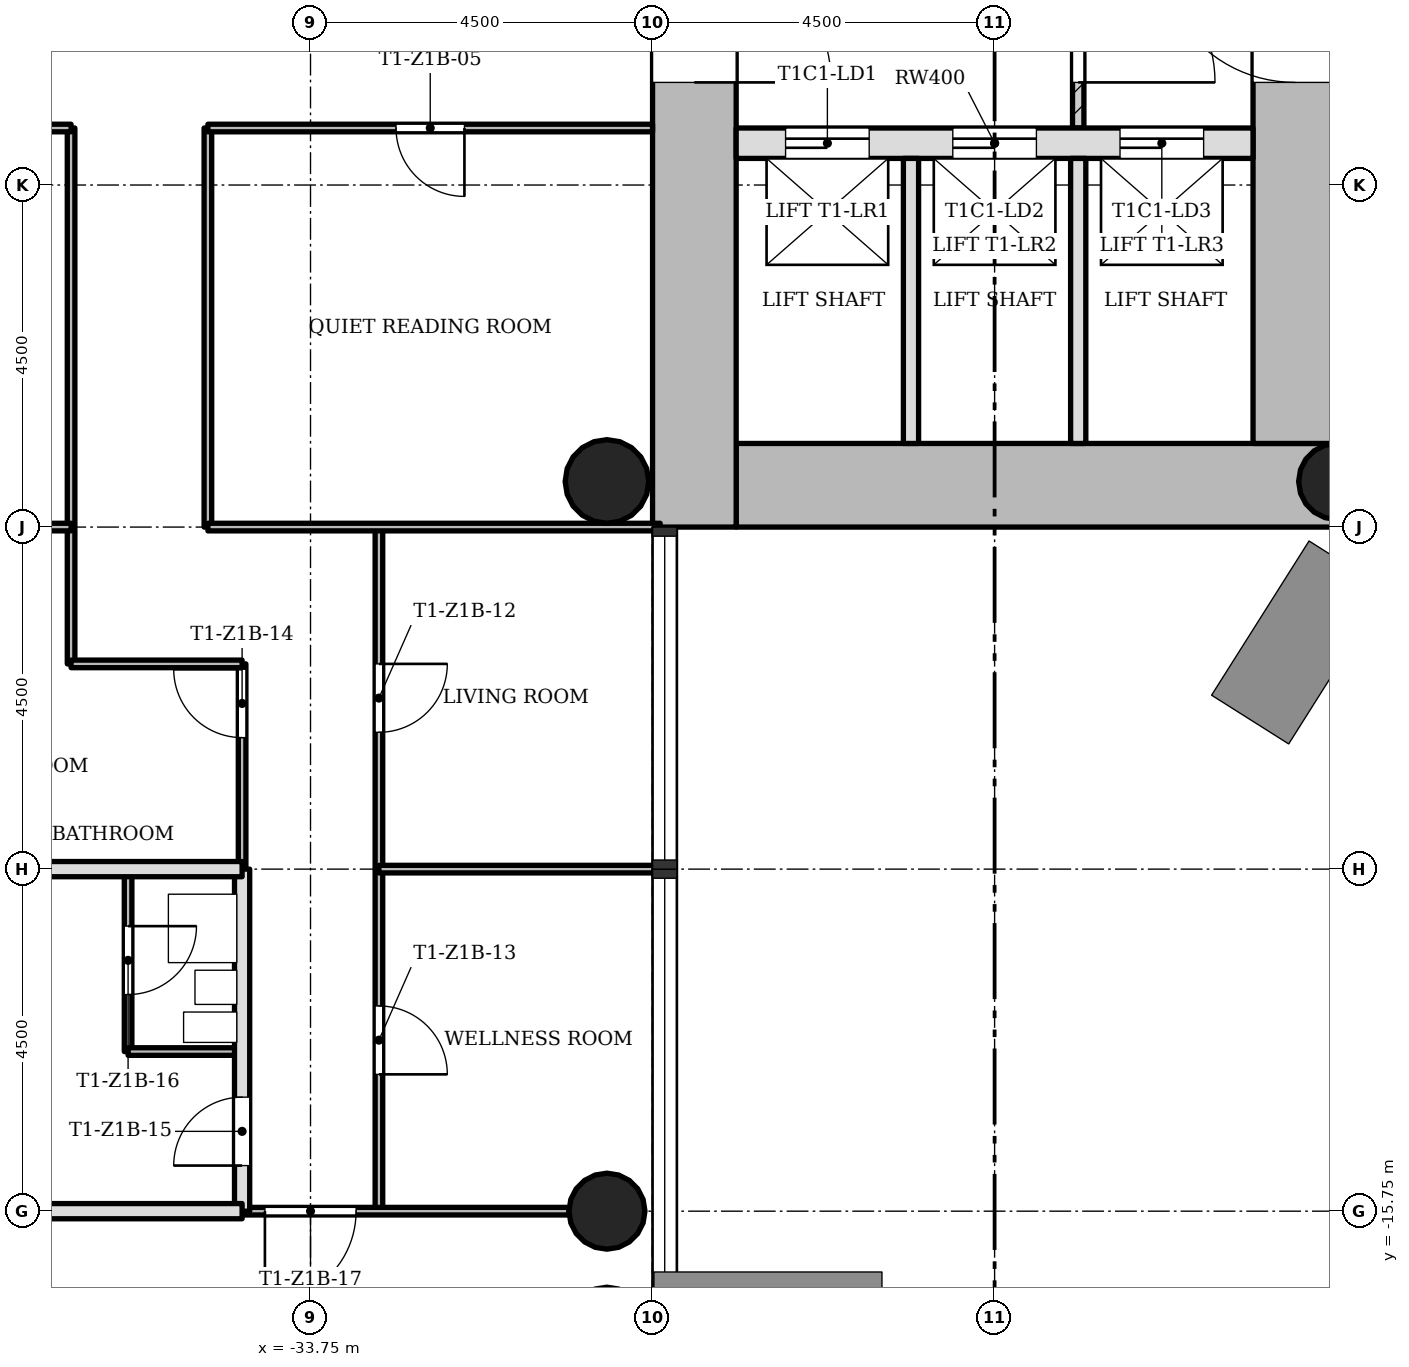
"""IFC4 building model, lengths in metres.
Left out: names, types, materials, properties, quantities, classifications, styles, units other than length and angle.
Written with IfcOpenShell. Run it as: python <this file> out.ifc"""

import sys

from ifc_helpers import new_model, si_unit, direction, frame, frame_2d, origin, origin_2d, place, context, subcontext, project, spatial, rectangle, hollow_circle, extrude, element, fill, save


model = new_model("IFC4")
c1 = context("Model", 3, precision=1e-05, world=origin(), true_north=direction((0.0, 1.0)))
c2 = subcontext(c1, "Body", "Model", "MODEL_VIEW")
j1 = project(units=[si_unit("LENGTHUNIT", "METRE"), si_unit("PLANEANGLEUNIT", "RADIAN")], contexts=[c1])
p1 = place(None, origin())
s1 = spatial("IfcSite", under=j1, at=p1, CompositionType="ELEMENT")
p2 = place(p1, origin())
s2 = spatial("IfcBuilding", under=s1, at=p2, CompositionType="ELEMENT")
p3 = place(p2, frame((0.0, 0.0, 38.1)))
s3 = spatial("IfcBuildingStorey", under=s2, at=p3, CompositionType="ELEMENT", Elevation=38.1)
p4 = place(p3, frame((-28.15, -6.2, 0.0), z_axis=(0.0, 0.0, 1.0), x_axis=(1.0, 0.0, 0.0)))
e1 = element("IfcWall", 1, at=p4, inside=s3, PredefinedType="SHEAR", context=c2, shape_type="SweptSolid", body=[
    extrude(rectangle(XDim=7.9, YDim=1.1, at=frame_2d((3.95, 0.0))), origin(), (0.0, 0.0, 1.0), 3.4),
])
p5 = place(p3, frame((-20.8, -5.65, 0.0), z_axis=(0.0, 0.0, 1.0), x_axis=(0.0, 1.0, 0.0)))
e2 = element("IfcWall", 2, at=p5, inside=s3, PredefinedType="SHEAR", context=c2, shape_type="SweptSolid", body=[
    extrude(rectangle(XDim=12.4, YDim=1.1, at=frame_2d((6.2, 0.0))), origin(), (0.0, 0.0, 1.0), 3.4),
])
p6 = place(p5, frame((4.75, 0.0, 0.0)))
e3 = element("IfcOpeningElement", 3, at=p6, cuts=e2, PredefinedType="OPENING", context=c2, shape_type="SweptSolid", body=[
    extrude(rectangle(XDim=1.8, YDim=2.1, at=frame_2d((0.9, 1.05))), frame((0.0, 0.56, 0.0), z_axis=(0.0, -1.0, 0.0), x_axis=(1.0, 0.0, 0.0)), (0.0, 0.0, 1.0), 1.12),
])
p7 = place(p3, frame((-28.7, 5.65, 0.0), z_axis=(0.0, 0.0, 1.0), x_axis=(0.0, -1.0, 0.0)))
e4 = element("IfcWall", 4, at=p7, inside=s3, PredefinedType="SHEAR", context=c2, shape_type="SweptSolid", body=[
    extrude(rectangle(XDim=12.4, YDim=1.1, at=frame_2d((6.2, 0.0))), origin(), (0.0, 0.0, 1.0), 3.4),
])
p8 = place(p7, frame((4.75, 0.0, 0.0)))
e5 = element("IfcOpeningElement", 5, at=p8, cuts=e4, PredefinedType="OPENING", context=c2, shape_type="SweptSolid", body=[
    extrude(rectangle(XDim=1.8, YDim=2.1, at=frame_2d((0.9, 1.05))), frame((0.0, 0.56, 0.0), z_axis=(0.0, -1.0, 0.0), x_axis=(1.0, 0.0, 0.0)), (0.0, 0.0, 1.0), 1.12),
])
p9 = place(p3, frame((-28.15, -1.7, 0.0), z_axis=(0.0, 0.0, 1.0), x_axis=(1.0, 0.0, 0.0)))
e6 = element("IfcWall", 6, at=p9, inside=s3, PredefinedType="SHEAR", context=c2, shape_type="SweptSolid", body=[
    extrude(rectangle(XDim=6.8, YDim=0.4, at=frame_2d((3.4, 0.0))), origin(), (0.0, 0.0, 1.0), 3.4),
])
p10 = place(p9, frame((0.65, 0.0, 0.0)))
e7 = element("IfcOpeningElement", 7, at=p10, cuts=e6, PredefinedType="OPENING", context=c2, shape_type="SweptSolid", body=[
    extrude(rectangle(XDim=1.1, YDim=2.1, at=frame_2d((0.55, 1.05))), frame((0.0, 0.21, 0.0), z_axis=(0.0, -1.0, 0.0), x_axis=(1.0, 0.0, 0.0)), (0.0, 0.0, 1.0), 0.42),
])
p11 = place(p9, frame((2.85, 0.0, 0.0)))
e8 = element("IfcOpeningElement", 8, at=p11, cuts=e6, PredefinedType="OPENING", context=c2, shape_type="SweptSolid", body=[
    extrude(rectangle(XDim=1.1, YDim=2.1, at=frame_2d((0.55, 1.05))), frame((0.0, 0.21, 0.0), z_axis=(0.0, -1.0, 0.0), x_axis=(1.0, 0.0, 0.0)), (0.0, 0.0, 1.0), 0.42),
])
p12 = place(p9, frame((5.05, 0.0, 0.0)))
e9 = element("IfcOpeningElement", 9, at=p12, cuts=e6, PredefinedType="OPENING", context=c2, shape_type="SweptSolid", body=[
    extrude(rectangle(XDim=1.1, YDim=2.1, at=frame_2d((0.55, 1.05))), frame((0.0, 0.21, 0.0), z_axis=(0.0, -1.0, 0.0), x_axis=(1.0, 0.0, 0.0)), (0.0, 0.0, 1.0), 0.42),
])
for number, where, z_axis, x_axis in (
    (10, (-20.25, -6.15, 0.0), (0.0, 0.0, 1.0), (1.0, 0.0, 0.0)),
    (11, (-29.85, -15.75, 0.0), (0.0, 0.0, 1.0), (1.0, 0.0, 0.0)),
):
    element("IfcColumn", number, at=place(p3, frame(where, z_axis=z_axis, x_axis=x_axis)), inside=s3, PredefinedType="COLUMN", context=c2, shape_type="SweptSolid", body=[
        extrude(hollow_circle(Radius=0.5, WallThickness=0.036, at=origin_2d()), origin(), (0.0, 0.0, 1.0), 3.4),
    ])
p13 = place(p3, frame((-29.85, -6.15, 0.0), z_axis=(0.0, 0.0, 1.0), x_axis=(1.0, 0.0, 0.0)))
e12 = element("IfcColumn", 12, at=p13, inside=s3, PredefinedType="COLUMN", context=c2, shape_type="SweptSolid", body=[
    extrude(hollow_circle(Radius=0.55, WallThickness=0.04, at=origin_2d()), origin(), (0.0, 0.0, 1.0), 3.4),
])
p14 = place(p3, frame((-23.65, -1.5, 0.0), z_axis=(0.0, 0.0, 1.0), x_axis=(0.0, 1.0, 0.0)))
e13 = element("IfcWall", 13, at=p14, inside=s3, PredefinedType="PARTITIONING", context=c2, shape_type="SweptSolid", body=[
    extrude(rectangle(XDim=3.0, YDim=0.15, at=frame_2d((1.5, 0.0))), origin(), (0.0, 0.0, 1.0), 3.0),
])
p15 = place(p14, frame((0.6, 0.0, 0.0)))
e14 = element("IfcOpeningElement", 14, at=p15, cuts=e13, PredefinedType="OPENING", context=c2, shape_type="SweptSolid", body=[
    extrude(rectangle(XDim=1.8, YDim=2.1, at=frame_2d((0.9, 1.05))), frame((0.0, 0.085, 0.0), z_axis=(0.0, -1.0, 0.0), x_axis=(1.0, 0.0, 0.0)), (0.0, 0.0, 1.0), 0.17),
])
for number, where, z_axis, x_axis in (
    (15, (-25.85, -5.65, 0.0), (0.0, 0.0, 1.0), (0.0, 1.0, 0.0)),
    (16, (-23.65, -5.65, 0.0), (0.0, 0.0, 1.0), (0.0, 1.0, 0.0)),
):
    element("IfcWall", number, at=place(p3, frame(where, z_axis=z_axis, x_axis=x_axis)), inside=s3, PredefinedType="SOLIDWALL", context=c2, shape_type="SweptSolid", body=[
        extrude(rectangle(XDim=3.75, YDim=0.2, at=frame_2d((1.875, 0.0))), origin(), (0.0, 0.0, 1.0), 3.0),
    ])
p16 = place(p3, frame((-36.9, -8.55, 0.0), z_axis=(0.0, 0.0, 1.0), x_axis=(0.0, 1.0, 0.0)))
e17 = element("IfcWall", 17, at=p16, inside=s3, PredefinedType="PARTITIONING", context=c2, shape_type="SweptSolid", body=[
    extrude(rectangle(XDim=7.05, YDim=0.1, at=frame_2d((3.525, 0.0))), origin(), (0.0, 0.0, 1.0), 3.0),
])
p17 = place(p3, frame((-36.15, -13.65, 0.0), z_axis=(0.0, 0.0, 1.0), x_axis=(0.0, 1.0, 0.0)))
e18 = element("IfcWall", 18, at=p17, inside=s3, PredefinedType="PARTITIONING", context=c2, shape_type="SweptSolid", body=[
    extrude(rectangle(XDim=2.4, YDim=0.1, at=frame_2d((1.2, 0.0))), origin(), (0.0, 0.0, 1.0), 3.0),
])
p18 = place(p17, frame((0.75, 0.0, 0.0)))
e19 = element("IfcOpeningElement", 19, at=p18, cuts=e18, PredefinedType="OPENING", context=c2, shape_type="SweptSolid", body=[
    extrude(rectangle(XDim=0.9, YDim=2.1, at=frame_2d((0.45, 1.05))), frame((0.0, 0.06, 0.0), z_axis=(0.0, -1.0, 0.0), x_axis=(1.0, 0.0, 0.0)), (0.0, 0.0, 1.0), 0.12),
])
p19 = place(p3, frame((-35.1, -6.75, 0.0), z_axis=(0.0, 0.0, 1.0), x_axis=(0.0, 1.0, 0.0)))
e20 = element("IfcWall", 20, at=p19, inside=s3, PredefinedType="PARTITIONING", context=c2, shape_type="SweptSolid", body=[
    extrude(rectangle(XDim=5.25, YDim=0.1, at=frame_2d((2.625, 0.0))), origin(), (0.0, 0.0, 1.0), 3.0),
])
p20 = place(p3, frame((-34.65, -11.25, 0.0), z_axis=(0.0, 0.0, 1.0), x_axis=(0.0, 1.0, 0.0)))
e21 = element("IfcWall", 21, at=p20, inside=s3, PredefinedType="PARTITIONING", context=c2, shape_type="SweptSolid", body=[
    extrude(rectangle(XDim=2.7, YDim=0.1, at=frame_2d((1.35, 0.0))), origin(), (0.0, 0.0, 1.0), 3.0),
])
p21 = place(p20, frame((1.73, 0.0, 0.0)))
e22 = element("IfcOpeningElement", 22, at=p21, cuts=e21, PredefinedType="OPENING", context=c2, shape_type="SweptSolid", body=[
    extrude(rectangle(XDim=0.9, YDim=2.1, at=frame_2d((0.45, 1.05))), frame((0.0, 0.06, 0.0), z_axis=(0.0, -1.0, 0.0), x_axis=(1.0, 0.0, 0.0)), (0.0, 0.0, 1.0), 0.12),
])
p22 = place(p3, frame((-34.65, -15.75, 0.0), z_axis=(0.0, 0.0, 1.0), x_axis=(0.0, 1.0, 0.0)))
e23 = element("IfcWall", 23, at=p22, inside=s3, PredefinedType="SOLIDWALL", context=c2, shape_type="SweptSolid", body=[
    extrude(rectangle(XDim=4.5, YDim=0.2, at=frame_2d((2.25, 0.0))), origin(), (0.0, 0.0, 1.0), 3.0),
])
p23 = place(p22, frame((0.6, 0.0, 0.0)))
e24 = element("IfcOpeningElement", 24, at=p23, cuts=e23, PredefinedType="OPENING", context=c2, shape_type="SweptSolid", body=[
    extrude(rectangle(XDim=0.9, YDim=2.1, at=frame_2d((0.45, 1.05))), frame((0.0, 0.11, 0.0), z_axis=(0.0, -1.0, 0.0), x_axis=(1.0, 0.0, 0.0)), (0.0, 0.0, 1.0), 0.22),
])
p24 = place(p3, frame((-32.85, -15.75, 0.0), z_axis=(0.0, 0.0, 1.0), x_axis=(0.0, 1.0, 0.0)))
e25 = element("IfcWall", 25, at=p24, inside=s3, PredefinedType="PARTITIONING", context=c2, shape_type="SweptSolid", body=[
    extrude(rectangle(XDim=9.0, YDim=0.1, at=frame_2d((4.5, 0.0))), origin(), (0.0, 0.0, 1.0), 3.0),
])
p25 = place(p24, frame((6.3, 0.0, 0.0)))
e26 = element("IfcOpeningElement", 26, at=p25, cuts=e25, PredefinedType="OPENING", context=c2, shape_type="SweptSolid", body=[
    extrude(rectangle(XDim=0.9, YDim=2.1, at=frame_2d((0.45, 1.05))), frame((0.0, 0.06, 0.0), z_axis=(0.0, -1.0, 0.0), x_axis=(1.0, 0.0, 0.0)), (0.0, 0.0, 1.0), 0.12),
])
p26 = place(p24, frame((1.8, 0.0, 0.0)))
e27 = element("IfcOpeningElement", 27, at=p26, cuts=e25, PredefinedType="OPENING", context=c2, shape_type="SweptSolid", body=[
    extrude(rectangle(XDim=0.9, YDim=2.1, at=frame_2d((0.45, 1.05))), frame((0.0, 0.06, 0.0), z_axis=(0.0, -1.0, 0.0), x_axis=(1.0, 0.0, 0.0)), (0.0, 0.0, 1.0), 0.12),
])
p27 = place(p3, frame((-34.65, -15.75, 0.0), z_axis=(0.0, 0.0, 1.0), x_axis=(1.0, 0.0, 0.0)))
e28 = element("IfcWall", 28, at=p27, inside=s3, PredefinedType="PARTITIONING", context=c2, shape_type="SweptSolid", body=[
    extrude(rectangle(XDim=4.3, YDim=0.1, at=frame_2d((2.15, 0.0))), origin(), (0.0, 0.0, 1.0), 3.0),
])
p28 = place(p27, frame((0.3, 0.0, 0.0)))
e29 = element("IfcOpeningElement", 29, at=p28, cuts=e28, PredefinedType="OPENING", context=c2, shape_type="SweptSolid", body=[
    extrude(rectangle(XDim=1.2, YDim=2.1, at=frame_2d((0.6, 1.05))), frame((0.0, 0.06, 0.0), z_axis=(0.0, -1.0, 0.0), x_axis=(1.0, 0.0, 0.0)), (0.0, 0.0, 1.0), 0.12),
])
p29 = place(p3, frame((-41.65, -15.75, 0.0), z_axis=(0.0, 0.0, 1.0), x_axis=(1.0, 0.0, 0.0)))
e30 = element("IfcWall", 30, at=p29, inside=s3, PredefinedType="SOLIDWALL", context=c2, shape_type="SweptSolid", body=[
    extrude(rectangle(XDim=7.0, YDim=0.2, at=frame_2d((3.5, 0.0))), origin(), (0.0, 0.0, 1.0), 3.0),
])
p30 = place(p3, frame((-36.15, -13.65, 0.0), z_axis=(0.0, 0.0, 1.0), x_axis=(1.0, 0.0, 0.0)))
e31 = element("IfcWall", 31, at=p30, inside=s3, PredefinedType="PARTITIONING", context=c2, shape_type="SweptSolid", body=[
    extrude(rectangle(XDim=1.5, YDim=0.1, at=frame_2d((0.75, 0.0))), origin(), (0.0, 0.0, 1.0), 3.0),
])
p31 = place(p3, frame((-32.85, -11.25, 0.0), z_axis=(0.0, 0.0, 1.0), x_axis=(1.0, 0.0, 0.0)))
e32 = element("IfcWall", 32, at=p31, inside=s3, PredefinedType="PARTITIONING", context=c2, shape_type="SweptSolid", body=[
    extrude(rectangle(XDim=3.7, YDim=0.1, at=frame_2d((1.85, 0.0))), origin(), (0.0, 0.0, 1.0), 3.0),
])
p32 = place(p3, frame((-42.85, -11.25, 0.0), z_axis=(0.0, 0.0, 1.0), x_axis=(1.0, 0.0, 0.0)))
e33 = element("IfcWall", 33, at=p32, inside=s3, PredefinedType="SOLIDWALL", context=c2, shape_type="SweptSolid", body=[
    extrude(rectangle(XDim=8.2, YDim=0.2, at=frame_2d((4.1, 0.0))), origin(), (0.0, 0.0, 1.0), 3.0),
])
p33 = place(p3, frame((-36.9, -8.55, 0.0), z_axis=(0.0, 0.0, 1.0), x_axis=(1.0, 0.0, 0.0)))
e34 = element("IfcWall", 34, at=p33, inside=s3, PredefinedType="PARTITIONING", context=c2, shape_type="SweptSolid", body=[
    extrude(rectangle(XDim=2.25, YDim=0.1, at=frame_2d((1.125, 0.0))), origin(), (0.0, 0.0, 1.0), 3.0),
])
for number, where, z_axis, x_axis in (
    (35, (-42.85, -6.75, 0.0), (0.0, 0.0, 1.0), (1.0, 0.0, 0.0)),
    (36, (-35.1, -6.75, 0.0), (0.0, 0.0, 1.0), (1.0, 0.0, 0.0)),
):
    element("IfcWall", number, at=place(p3, frame(where, z_axis=z_axis, x_axis=x_axis)), inside=s3, PredefinedType="PARTITIONING", context=c2, shape_type="SweptSolid", body=[
        extrude(rectangle(XDim=5.95, YDim=0.1, at=frame_2d((2.975, 0.0))), origin(), (0.0, 0.0, 1.0), 3.0),
    ])
p34 = place(p3, frame((-42.75, -1.5, 0.0), z_axis=(0.0, 0.0, 1.0), x_axis=(1.0, 0.0, 0.0)))
e37 = element("IfcWall", 37, at=p34, inside=s3, PredefinedType="PARTITIONING", context=c2, shape_type="SweptSolid", body=[
    extrude(rectangle(XDim=5.85, YDim=0.1, at=frame_2d((2.925, 0.0))), origin(), (0.0, 0.0, 1.0), 3.0),
])
p35 = place(p34, frame((2.475, 0.0, 0.0)))
e38 = element("IfcOpeningElement", 38, at=p35, cuts=e37, PredefinedType="OPENING", context=c2, shape_type="SweptSolid", body=[
    extrude(rectangle(XDim=0.9, YDim=2.1, at=frame_2d((0.45, 1.05))), frame((0.0, 0.06, 0.0), z_axis=(0.0, -1.0, 0.0), x_axis=(1.0, 0.0, 0.0)), (0.0, 0.0, 1.0), 0.12),
])
p36 = place(p3, frame((-35.1, -1.5, 0.0), z_axis=(0.0, 0.0, 1.0), x_axis=(1.0, 0.0, 0.0)))
e39 = element("IfcWall", 39, at=p36, inside=s3, PredefinedType="PARTITIONING", context=c2, shape_type="SweptSolid", body=[
    extrude(rectangle(XDim=5.85, YDim=0.1, at=frame_2d((2.925, 0.0))), origin(), (0.0, 0.0, 1.0), 3.0),
])
p37 = place(p36, frame((2.475, 0.0, 0.0)))
e40 = element("IfcOpeningElement", 40, at=p37, cuts=e39, PredefinedType="OPENING", context=c2, shape_type="SweptSolid", body=[
    extrude(rectangle(XDim=0.9, YDim=2.1, at=frame_2d((0.45, 1.05))), frame((0.0, 0.06, 0.0), z_axis=(0.0, -1.0, 0.0), x_axis=(1.0, 0.0, 0.0)), (0.0, 0.0, 1.0), 0.12),
])
p38 = place(p15, origin())
e41 = element("IfcDoor", 41, at=p38, inside=s3, OperationType="SINGLE_SWING_LEFT", PredefinedType="DOOR", context=c2, shape_type="SweptSolid", body=[
    extrude(rectangle(XDim=1.8, YDim=2.1, at=frame_2d((0.9, 1.05))), frame((0.0, 0.025, 0.0), z_axis=(0.0, -1.0, 0.0), x_axis=(1.0, 0.0, 0.0)), (0.0, 0.0, 1.0), 0.05),
])
fill(e14, e41)
p39 = place(p37, origin())
e42 = element("IfcDoor", 42, at=p39, inside=s3, OperationType="SINGLE_SWING_RIGHT", PredefinedType="DOOR", context=c2, shape_type="SweptSolid", body=[
    extrude(rectangle(XDim=0.9, YDim=2.1, at=frame_2d((0.45, 1.05))), frame((0.0, 0.025, 0.0), z_axis=(0.0, -1.0, 0.0), x_axis=(1.0, 0.0, 0.0)), (0.0, 0.0, 1.0), 0.05),
])
fill(e40, e42)
p40 = place(p25, origin())
e43 = element("IfcDoor", 43, at=p40, inside=s3, OperationType="SINGLE_SWING_RIGHT", PredefinedType="DOOR", context=c2, shape_type="SweptSolid", body=[
    extrude(rectangle(XDim=0.9, YDim=2.1, at=frame_2d((0.45, 1.05))), frame((0.0, 0.025, 0.0), z_axis=(0.0, -1.0, 0.0), x_axis=(1.0, 0.0, 0.0)), (0.0, 0.0, 1.0), 0.05),
])
fill(e26, e43)
p41 = place(p26, origin())
e44 = element("IfcDoor", 44, at=p41, inside=s3, OperationType="SINGLE_SWING_LEFT", PredefinedType="DOOR", context=c2, shape_type="SweptSolid", body=[
    extrude(rectangle(XDim=0.9, YDim=2.1, at=frame_2d((0.45, 1.05))), frame((0.0, 0.025, 0.0), z_axis=(0.0, -1.0, 0.0), x_axis=(1.0, 0.0, 0.0)), (0.0, 0.0, 1.0), 0.05),
])
fill(e27, e44)
p42 = place(p21, origin())
e45 = element("IfcDoor", 45, at=p42, inside=s3, OperationType="SINGLE_SWING_LEFT", PredefinedType="DOOR", context=c2, shape_type="SweptSolid", body=[
    extrude(rectangle(XDim=0.9, YDim=2.1, at=frame_2d((0.45, 1.05))), frame((0.0, 0.025, 0.0), z_axis=(0.0, -1.0, 0.0), x_axis=(1.0, 0.0, 0.0)), (0.0, 0.0, 1.0), 0.05),
])
fill(e22, e45)
p43 = place(p23, origin())
e46 = element("IfcDoor", 46, at=p43, inside=s3, OperationType="SINGLE_SWING_RIGHT", PredefinedType="DOOR", context=c2, shape_type="SweptSolid", body=[
    extrude(rectangle(XDim=0.9, YDim=2.1, at=frame_2d((0.45, 1.05))), frame((0.0, 0.025, 0.0), z_axis=(0.0, -1.0, 0.0), x_axis=(1.0, 0.0, 0.0)), (0.0, 0.0, 1.0), 0.05),
])
fill(e24, e46)
p44 = place(p18, origin())
e47 = element("IfcDoor", 47, at=p44, inside=s3, OperationType="SINGLE_SWING_RIGHT", PredefinedType="DOOR", context=c2, shape_type="SweptSolid", body=[
    extrude(rectangle(XDim=0.9, YDim=2.1, at=frame_2d((0.45, 1.05))), frame((0.0, 0.025, 0.0), z_axis=(0.0, -1.0, 0.0), x_axis=(1.0, 0.0, 0.0)), (0.0, 0.0, 1.0), 0.05),
])
fill(e19, e47)
p45 = place(p28, origin())
e48 = element("IfcDoor", 48, at=p45, inside=s3, OperationType="SINGLE_SWING_LEFT", PredefinedType="DOOR", context=c2, shape_type="SweptSolid", body=[
    extrude(rectangle(XDim=1.2, YDim=2.1, at=frame_2d((0.6, 1.05))), frame((0.0, 0.025, 0.0), z_axis=(0.0, -1.0, 0.0), x_axis=(1.0, 0.0, 0.0)), (0.0, 0.0, 1.0), 0.05),
])
fill(e29, e48)
p46 = place(p10, origin())
e49 = element("IfcDoor", 49, at=p46, inside=s3, OperationType="SLIDING_TO_LEFT", PredefinedType="DOOR", context=c2, shape_type="SweptSolid", body=[
    extrude(rectangle(XDim=1.1, YDim=2.1, at=frame_2d((0.55, 1.05))), frame((0.0, 0.025, 0.0), z_axis=(0.0, -1.0, 0.0), x_axis=(1.0, 0.0, 0.0)), (0.0, 0.0, 1.0), 0.05),
])
fill(e7, e49)
p47 = place(p11, origin())
e50 = element("IfcDoor", 50, at=p47, inside=s3, OperationType="SLIDING_TO_LEFT", PredefinedType="DOOR", context=c2, shape_type="SweptSolid", body=[
    extrude(rectangle(XDim=1.1, YDim=2.1, at=frame_2d((0.55, 1.05))), frame((0.0, 0.025, 0.0), z_axis=(0.0, -1.0, 0.0), x_axis=(1.0, 0.0, 0.0)), (0.0, 0.0, 1.0), 0.05),
])
fill(e8, e50)
p48 = place(p12, origin())
e51 = element("IfcDoor", 51, at=p48, inside=s3, OperationType="SLIDING_TO_LEFT", PredefinedType="DOOR", context=c2, shape_type="SweptSolid", body=[
    extrude(rectangle(XDim=1.1, YDim=2.1, at=frame_2d((0.55, 1.05))), frame((0.0, 0.025, 0.0), z_axis=(0.0, -1.0, 0.0), x_axis=(1.0, 0.0, 0.0)), (0.0, 0.0, 1.0), 0.05),
])
fill(e9, e51)
p49 = place(p8, origin())
e52 = element("IfcDoor", 52, at=p49, inside=s3, OperationType="SINGLE_SWING_LEFT", PredefinedType="DOOR", context=c2, shape_type="SweptSolid", body=[
    extrude(rectangle(XDim=1.8, YDim=2.1, at=frame_2d((0.9, 1.05))), frame((0.0, 0.025, 0.0), z_axis=(0.0, -1.0, 0.0), x_axis=(1.0, 0.0, 0.0)), (0.0, 0.0, 1.0), 0.05),
])
fill(e5, e52)
p50 = place(p6, origin())
e53 = element("IfcDoor", 53, at=p50, inside=s3, OperationType="SINGLE_SWING_LEFT", PredefinedType="DOOR", context=c2, shape_type="SweptSolid", body=[
    extrude(rectangle(XDim=1.8, YDim=2.1, at=frame_2d((0.9, 1.05))), frame((0.0, 0.025, 0.0), z_axis=(0.0, -1.0, 0.0), x_axis=(1.0, 0.0, 0.0)), (0.0, 0.0, 1.0), 0.05),
])
fill(e3, e53)
save(model, sys.argv[1])
